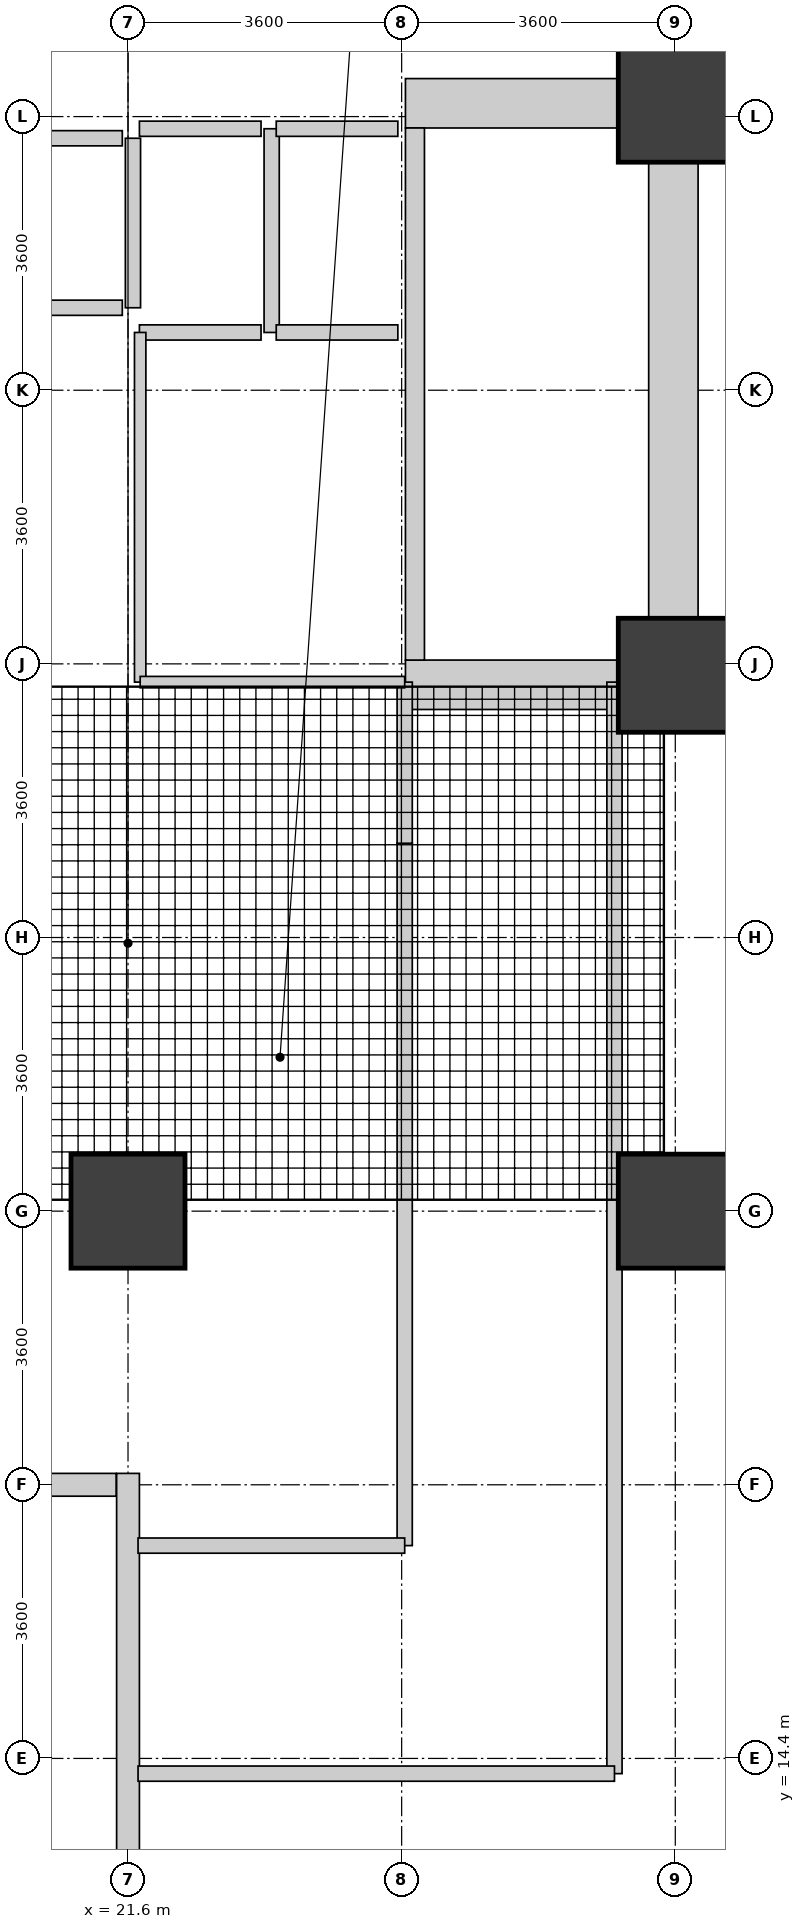
"""IFC4 building model, lengths in metres.
Left out: names, types, materials, properties, quantities, classifications, styles, units other than length and angle.
Written with IfcOpenShell. Run it as: python <this file> out.ifc"""

import sys

from ifc_helpers import new_model, si_unit, direction, frame, frame_2d, origin, origin_2d, place, context, subcontext, project, spatial, rectangle, extrude, source, transform, mapped, element, fill, save


model = new_model("IFC4")
c1 = context("Model", 3, precision=1e-05, world=origin(), true_north=direction((0.0, 1.0)))
c2 = subcontext(c1, "Body", "Model", "MODEL_VIEW")
j1 = project(units=[si_unit("LENGTHUNIT", "METRE"), si_unit("PLANEANGLEUNIT", "RADIAN")], contexts=[c1])
p1 = place(None, origin())
s1 = spatial("IfcSite", under=j1, at=p1, CompositionType="ELEMENT")
p2 = place(p1, origin())
s2 = spatial("IfcBuilding", under=s1, at=p2, CompositionType="ELEMENT")
p3 = place(p2, origin())
s3 = spatial("IfcBuildingStorey", under=s2, at=p3, CompositionType="ELEMENT", Elevation=0.0)
p4 = place(p3, frame((28.775, 28.2, 0.0), z_axis=(0.0, 0.0, 1.0), x_axis=(0.0, 1.0, 0.0)))
e1 = element("IfcWall", 1, at=p4, inside=s3, PredefinedType="SHEAR", context=c2, shape_type="SweptSolid", body=[
    extrude(rectangle(XDim=8.3, YDim=0.65, at=frame_2d((4.15, 0.0))), origin(), (0.0, 0.0, 1.0), 5.12),
])
p5 = place(p3, frame((25.25, 28.525, 0.0), z_axis=(0.0, 0.0, 1.0), x_axis=(1.0, 0.0, 0.0)))
e2 = element("IfcWall", 2, at=p5, inside=s3, PredefinedType="SHEAR", context=c2, shape_type="SweptSolid", body=[
    extrude(rectangle(XDim=3.2, YDim=0.65, at=frame_2d((1.6, 0.0))), origin(), (0.0, 0.0, 1.0), 5.12),
])
p6 = place(p5, frame((0.35, 0.0, 0.0)))
e3 = element("IfcOpeningElement", 3, at=p6, cuts=e2, PredefinedType="OPENING", context=c2, shape_type="SweptSolid", body=[
    extrude(rectangle(XDim=1.1, YDim=2.08, at=frame_2d((0.55, 1.04))), frame((0.0, 0.335, 0.0), z_axis=(0.0, -1.0, 0.0), x_axis=(1.0, 0.0, 0.0)), (0.0, 0.0, 1.0), 0.67),
])
p7 = place(p3, frame((25.25, 36.175, 0.0), z_axis=(0.0, 0.0, 1.0), x_axis=(1.0, 0.0, 0.0)))
e4 = element("IfcWall", 4, at=p7, inside=s3, PredefinedType="SHEAR", context=c2, shape_type="SweptSolid", body=[
    extrude(rectangle(XDim=3.2, YDim=0.65, at=frame_2d((1.6, 0.0))), origin(), (0.0, 0.0, 1.0), 5.12),
])
p8 = place(p3, frame((25.375, 28.85, 0.0), z_axis=(0.0, 0.0, 1.0), x_axis=(0.0, 1.0, 0.0)))
e5 = element("IfcWall", 5, at=p8, inside=s3, PredefinedType="SHEAR", context=c2, shape_type="SweptSolid", body=[
    extrude(rectangle(XDim=7.0, YDim=0.25, at=frame_2d((3.5, 0.0))), origin(), (0.0, 0.0, 1.0), 5.12),
])
p9 = place(p8, frame((0.15, 0.0, 0.0)))
e6 = element("IfcOpeningElement", 6, at=p9, cuts=e5, PredefinedType="OPENING", context=c2, shape_type="SweptSolid", body=[
    extrude(rectangle(XDim=1.1, YDim=2.08, at=frame_2d((0.55, 1.04))), frame((0.0, 0.135, 0.0), z_axis=(0.0, -1.0, 0.0), x_axis=(1.0, 0.0, 0.0)), (0.0, 0.0, 1.0), 0.27),
])
m1 = source(origin(), c2, "Body", "SweptSolid", [
    extrude(rectangle(XDim=1.5, YDim=1.5, at=origin_2d()), origin(), (0.0, 0.0, 1.0), 5.4),
])
for number, where, z_axis, x_axis in (
    (7, (21.6, 21.6, 0.0), (0.0, 0.0, 1.0), (1.0, 0.0, 0.0)),
    (8, (28.8, 21.6, 0.0), (0.0, 0.0, 1.0), (1.0, 0.0, 0.0)),
    (9, (28.8, 28.65, 0.0), (0.0, 0.0, 1.0), (1.0, 0.0, 0.0)),
    (10, (28.8, 36.15, 0.0), (0.0, 0.0, 1.0), (1.0, 0.0, 0.0)),
):
    element("IfcColumn", number, at=place(p3, frame(where, z_axis=z_axis, x_axis=x_axis)), inside=s3, PredefinedType="COLUMN", context=c2, shape_type="MappedRepresentation", body=[
        mapped(m1, transform((0.0, 0.0, 0.0), x_axis=(1.0, 0.0, 0.0), y_axis=(0.0, 1.0, 0.0), z_axis=(0.0, 0.0, 1.0), scale=1.0)),
    ])
p10 = place(p3, frame((21.445, 18.0, 0.0), z_axis=(0.0, 0.0, 1.0), x_axis=(-1.0, 0.0, 0.0)))
e11 = element("IfcWall", 11, at=p10, inside=s3, PredefinedType="STANDARD", context=c2, shape_type="SweptSolid", body=[
    extrude(rectangle(XDim=20.294, YDim=0.3, at=frame_2d((10.147, 0.0))), origin(), (0.0, 0.0, 1.0), 5.1),
])
p11 = place(p10, frame((4.02, 0.0, 0.0)))
e12 = element("IfcOpeningElement", 12, at=p11, cuts=e11, PredefinedType="OPENING", context=c2, shape_type="SweptSolid", body=[
    extrude(rectangle(XDim=1.85, YDim=2.25, at=frame_2d((0.925, 1.125))), frame((0.0, 0.16, 0.0), z_axis=(0.0, -1.0, 0.0), x_axis=(1.0, 0.0, 0.0)), (0.0, 0.0, 1.0), 0.32),
])
p12 = place(p10, frame((1.12, 0.0, 0.0)))
e13 = element("IfcOpeningElement", 13, at=p12, cuts=e11, PredefinedType="OPENING", context=c2, shape_type="SweptSolid", body=[
    extrude(rectangle(XDim=1.95, YDim=2.4, at=frame_2d((0.975, 1.2))), frame((0.0, 0.16, 0.0), z_axis=(0.0, -1.0, 0.0), x_axis=(1.0, 0.0, 0.0)), (0.0, 0.0, 1.0), 0.32),
])
p13 = place(p10, frame((7.256, 0.0, 0.9)))
e14 = element("IfcOpeningElement", 14, at=p13, cuts=e11, PredefinedType="OPENING", context=c2, shape_type="SweptSolid", body=[
    extrude(rectangle(XDim=2.4, YDim=2.5, at=frame_2d((1.2, 1.25))), frame((0.0, 0.16, 0.0), z_axis=(0.0, -1.0, 0.0), x_axis=(1.0, 0.0, 0.0)), (0.0, 0.0, 1.0), 0.32),
])
p14 = place(p10, frame((14.021, 0.0, 0.9)))
e15 = element("IfcOpeningElement", 15, at=p14, cuts=e11, PredefinedType="OPENING", context=c2, shape_type="SweptSolid", body=[
    extrude(rectangle(XDim=2.4, YDim=2.5, at=frame_2d((1.2, 1.25))), frame((0.0, 0.16, 0.0), z_axis=(0.0, -1.0, 0.0), x_axis=(1.0, 0.0, 0.0)), (0.0, 0.0, 1.0), 0.32),
])
p15 = place(p10, frame((17.403, 0.0, 0.9)))
e16 = element("IfcOpeningElement", 16, at=p15, cuts=e11, PredefinedType="OPENING", context=c2, shape_type="SweptSolid", body=[
    extrude(rectangle(XDim=2.4, YDim=2.5, at=frame_2d((1.2, 1.25))), frame((0.0, 0.16, 0.0), z_axis=(0.0, -1.0, 0.0), x_axis=(1.0, 0.0, 0.0)), (0.0, 0.0, 1.0), 0.32),
])
p16 = place(p3, frame((21.6, 1.65, 0.0), z_axis=(0.0, 0.0, 1.0), x_axis=(0.0, 1.0, 0.0)))
e17 = element("IfcWall", 17, at=p16, inside=s3, PredefinedType="STANDARD", context=c2, shape_type="SweptSolid", body=[
    extrude(rectangle(XDim=16.5, YDim=0.3, at=frame_2d((8.25, 0.0))), origin(), (0.0, 0.0, 1.0), 5.1),
])
p17 = place(p16, frame((13.125, 0.0, 0.0)))
e18 = element("IfcOpeningElement", 18, at=p17, cuts=e17, PredefinedType="OPENING", context=c2, shape_type="SweptSolid", body=[
    extrude(rectangle(XDim=1.85, YDim=2.25, at=frame_2d((0.925, 1.125))), frame((0.0, 0.16, 0.0), z_axis=(0.0, -1.0, 0.0), x_axis=(1.0, 0.0, 0.0)), (0.0, 0.0, 1.0), 0.32),
])
p18 = place(p16, frame((0.45, 0.0, 0.9)))
e19 = element("IfcOpeningElement", 19, at=p18, cuts=e17, PredefinedType="OPENING", context=c2, shape_type="SweptSolid", body=[
    extrude(rectangle(XDim=2.4, YDim=2.5, at=frame_2d((1.2, 1.25))), frame((0.0, 0.16, 0.0), z_axis=(0.0, -1.0, 0.0), x_axis=(1.0, 0.0, 0.0)), (0.0, 0.0, 1.0), 0.32),
])
p19 = place(p16, frame((7.05, 0.0, 0.9)))
e20 = element("IfcOpeningElement", 20, at=p19, cuts=e17, PredefinedType="OPENING", context=c2, shape_type="SweptSolid", body=[
    extrude(rectangle(XDim=2.4, YDim=2.5, at=frame_2d((1.2, 1.25))), frame((0.0, 0.16, 0.0), z_axis=(0.0, -1.0, 0.0), x_axis=(1.0, 0.0, 0.0)), (0.0, 0.0, 1.0), 0.32),
])
p20 = place(p3, frame((19.875, 33.485, 0.0), z_axis=(0.0, 0.0, 1.0), x_axis=(1.0, 0.0, 0.0)))
e21 = element("IfcWall", 21, at=p20, inside=s3, PredefinedType="PARTITIONING", context=c2, shape_type="SweptSolid", body=[
    extrude(rectangle(XDim=1.65, YDim=0.2, at=frame_2d((0.825, 0.0))), origin(), (0.0, 0.0, 1.0), 5.1),
])
p21 = place(p20, frame((0.275, 0.0, 0.0)))
e22 = element("IfcOpeningElement", 22, at=p21, cuts=e21, PredefinedType="OPENING", context=c2, shape_type="SweptSolid", body=[
    extrude(rectangle(XDim=1.1, YDim=2.12, at=frame_2d((0.55, 1.06))), frame((0.0, 0.11, 0.0), z_axis=(0.0, -1.0, 0.0), x_axis=(1.0, 0.0, 0.0)), (0.0, 0.0, 1.0), 0.22),
])
p22 = place(p3, frame((19.875, 35.715, 0.0), z_axis=(0.0, 0.0, 1.0), x_axis=(1.0, 0.0, 0.0)))
e23 = element("IfcWall", 23, at=p22, inside=s3, PredefinedType="PARTITIONING", context=c2, shape_type="SweptSolid", body=[
    extrude(rectangle(XDim=1.65, YDim=0.2, at=frame_2d((0.825, 0.0))), origin(), (0.0, 0.0, 1.0), 5.1),
])
p23 = place(p3, frame((21.665, 33.485, 0.0), z_axis=(0.0, 0.0, 1.0), x_axis=(0.0, 1.0, 0.0)))
e24 = element("IfcWall", 24, at=p23, inside=s3, PredefinedType="PARTITIONING", context=c2, shape_type="SweptSolid", body=[
    extrude(rectangle(XDim=2.23, YDim=0.2, at=frame_2d((1.115, 0.0))), origin(), (0.0, 0.0, 1.0), 5.1),
])
p24 = place(p3, frame((21.75, 33.16, 0.0), z_axis=(0.0, 0.0, 1.0), x_axis=(1.0, 0.0, 0.0)))
e25 = element("IfcWall", 25, at=p24, inside=s3, PredefinedType="PARTITIONING", context=c2, shape_type="SweptSolid", body=[
    extrude(rectangle(XDim=1.6, YDim=0.2, at=frame_2d((0.8, 0.0))), origin(), (0.0, 0.0, 1.0), 5.1),
])
p25 = place(p24, frame((0.2, 0.0, 0.0)))
e26 = element("IfcOpeningElement", 26, at=p25, cuts=e25, PredefinedType="OPENING", context=c2, shape_type="SweptSolid", body=[
    extrude(rectangle(XDim=1.2, YDim=2.12, at=frame_2d((0.6, 1.06))), frame((0.0, 0.11, 0.0), z_axis=(0.0, -1.0, 0.0), x_axis=(1.0, 0.0, 0.0)), (0.0, 0.0, 1.0), 0.22),
])
p26 = place(p3, frame((21.75, 35.84, 0.0), z_axis=(0.0, 0.0, 1.0), x_axis=(1.0, 0.0, 0.0)))
e27 = element("IfcWall", 27, at=p26, inside=s3, PredefinedType="PARTITIONING", context=c2, shape_type="SweptSolid", body=[
    extrude(rectangle(XDim=1.6, YDim=0.2, at=frame_2d((0.8, 0.0))), origin(), (0.0, 0.0, 1.0), 3.9),
])
p27 = place(p3, frame((23.49, 33.16, 0.0), z_axis=(0.0, 0.0, 1.0), x_axis=(0.0, 1.0, 0.0)))
e28 = element("IfcWall", 28, at=p27, inside=s3, PredefinedType="PARTITIONING", context=c2, shape_type="SweptSolid", body=[
    extrude(rectangle(XDim=2.68, YDim=0.2, at=frame_2d((1.34, 0.0))), origin(), (0.0, 0.0, 1.0), 5.1),
])
p28 = place(p3, frame((23.55, 33.16, 0.0), z_axis=(0.0, 0.0, 1.0), x_axis=(1.0, 0.0, 0.0)))
e29 = element("IfcWall", 29, at=p28, inside=s3, PredefinedType="PARTITIONING", context=c2, shape_type="SweptSolid", body=[
    extrude(rectangle(XDim=1.6, YDim=0.2, at=frame_2d((0.8, 0.0))), origin(), (0.0, 0.0, 1.0), 5.1),
])
p29 = place(p28, frame((0.2, 0.0, 0.0)))
e30 = element("IfcOpeningElement", 30, at=p29, cuts=e29, PredefinedType="OPENING", context=c2, shape_type="SweptSolid", body=[
    extrude(rectangle(XDim=1.2, YDim=2.12, at=frame_2d((0.6, 1.06))), frame((0.0, 0.11, 0.0), z_axis=(0.0, -1.0, 0.0), x_axis=(1.0, 0.0, 0.0)), (0.0, 0.0, 1.0), 0.22),
])
p30 = place(p3, frame((23.55, 35.84, 0.0), z_axis=(0.0, 0.0, 1.0), x_axis=(1.0, 0.0, 0.0)))
e31 = element("IfcWall", 31, at=p30, inside=s3, PredefinedType="PARTITIONING", context=c2, shape_type="SweptSolid", body=[
    extrude(rectangle(XDim=1.6, YDim=0.2, at=frame_2d((0.8, 0.0))), origin(), (0.0, 0.0, 1.0), 3.9),
])
p31 = place(p3, frame((28.0, 14.2, 0.0), z_axis=(0.0, 0.0, 1.0), x_axis=(0.0, 1.0, 0.0)))
e32 = element("IfcWall", 32, at=p31, inside=s3, PredefinedType="PARTITIONING", context=c2, shape_type="SweptSolid", body=[
    extrude(rectangle(XDim=14.36, YDim=0.2, at=frame_2d((7.18, 0.0))), origin(), (0.0, 0.0, 1.0), 5.1),
])
p32 = place(p3, frame((25.24, 17.2, 0.0), z_axis=(0.0, 0.0, 1.0), x_axis=(0.0, 1.0, 0.0)))
e33 = element("IfcWall", 33, at=p32, inside=s3, PredefinedType="PARTITIONING", context=c2, shape_type="SweptSolid", body=[
    extrude(rectangle(XDim=9.24, YDim=0.2, at=frame_2d((4.62, 0.0))), origin(), (0.0, 0.0, 1.0), 5.1),
])
p33 = place(p3, frame((21.732, 14.2, 0.0), z_axis=(0.0, 0.0, 1.0), x_axis=(1.0, 0.0, 0.0)))
e34 = element("IfcWall", 34, at=p33, inside=s3, PredefinedType="PARTITIONING", context=c2, shape_type="SweptSolid", body=[
    extrude(rectangle(XDim=6.268, YDim=0.2, at=frame_2d((3.134, 0.0))), origin(), (0.0, 0.0, 1.0), 5.1),
])
p34 = place(p3, frame((21.732, 17.2, 0.0), z_axis=(0.0, 0.0, 1.0), x_axis=(1.0, 0.0, 0.0)))
e35 = element("IfcWall", 35, at=p34, inside=s3, PredefinedType="PARTITIONING", context=c2, shape_type="SweptSolid", body=[
    extrude(rectangle(XDim=3.508, YDim=0.2, at=frame_2d((1.754, 0.0))), origin(), (0.0, 0.0, 1.0), 5.1),
])
p35 = place(p3, frame((25.24, 26.44, 0.0), z_axis=(0.0, 0.0, 1.0), x_axis=(0.0, 1.0, 0.0)))
e36 = element("IfcWall", 36, at=p35, inside=s3, PredefinedType="PARTITIONING", context=c2, shape_type="SweptSolid", body=[
    extrude(rectangle(XDim=2.12, YDim=0.2, at=frame_2d((1.06, 0.0))), origin(), (0.0, 0.0, 1.0), 5.1),
])
p36 = place(p3, frame((21.76, 28.56, 0.0), z_axis=(0.0, 0.0, 1.0), x_axis=(0.0, 1.0, 0.0)))
e37 = element("IfcWall", 37, at=p36, inside=s3, PredefinedType="PARTITIONING", context=c2, shape_type="SweptSolid", body=[
    extrude(rectangle(XDim=4.6, YDim=0.15, at=frame_2d((2.3, 0.0))), origin(), (0.0, 0.0, 1.0), 5.1),
])
p37 = place(p36, frame((1.55, 0.0, 0.0)))
e38 = element("IfcOpeningElement", 38, at=p37, cuts=e37, PredefinedType="OPENING", context=c2, shape_type="SweptSolid", body=[
    extrude(rectangle(XDim=1.5, YDim=2.1, at=frame_2d((0.75, 1.05))), frame((0.0, 0.085, 0.0), z_axis=(0.0, -1.0, 0.0), x_axis=(1.0, 0.0, 0.0)), (0.0, 0.0, 1.0), 0.17),
])
p38 = place(p3, frame((21.76, 28.56, 0.0), z_axis=(0.0, 0.0, 1.0), x_axis=(1.0, 0.0, 0.0)))
e39 = element("IfcWall", 39, at=p38, inside=s3, PredefinedType="PARTITIONING", context=c2, shape_type="SweptSolid", body=[
    extrude(rectangle(XDim=3.48, YDim=0.15, at=frame_2d((1.74, 0.0))), origin(), (0.0, 0.0, 1.0), 3.9),
])
p39 = place(p17, origin())
e40 = element("IfcDoor", 40, at=p39, inside=s3, OperationType="DOUBLE_DOOR_SINGLE_SWING", PredefinedType="DOOR", context=c2, shape_type="SweptSolid", body=[
    extrude(rectangle(XDim=1.85, YDim=2.25, at=frame_2d((0.925, 1.125))), frame((0.0, 0.025, 0.0), z_axis=(0.0, -1.0, 0.0), x_axis=(1.0, 0.0, 0.0)), (0.0, 0.0, 1.0), 0.05),
])
fill(e18, e40)
p40 = place(p9, origin())
e41 = element("IfcDoor", 41, at=p40, inside=s3, OperationType="SINGLE_SWING_LEFT", PredefinedType="DOOR", context=c2, shape_type="SweptSolid", body=[
    extrude(rectangle(XDim=1.1, YDim=2.08, at=frame_2d((0.55, 1.04))), frame((0.0, 0.025, 0.0), z_axis=(0.0, -1.0, 0.0), x_axis=(1.0, 0.0, 0.0)), (0.0, 0.0, 1.0), 0.05),
])
fill(e6, e41)
p41 = place(p6, origin())
e42 = element("IfcDoor", 42, at=p41, inside=s3, OperationType="SINGLE_SWING_RIGHT", PredefinedType="DOOR", context=c2, shape_type="SweptSolid", body=[
    extrude(rectangle(XDim=1.1, YDim=2.08, at=frame_2d((0.55, 1.04))), frame((0.0, 0.025, 0.0), z_axis=(0.0, -1.0, 0.0), x_axis=(1.0, 0.0, 0.0)), (0.0, 0.0, 1.0), 0.05),
])
fill(e3, e42)
p42 = place(p21, origin())
e43 = element("IfcDoor", 43, at=p42, inside=s3, OperationType="SLIDING_TO_LEFT", PredefinedType="DOOR", context=c2, shape_type="SweptSolid", body=[
    extrude(rectangle(XDim=1.1, YDim=2.12, at=frame_2d((0.55, 1.06))), frame((0.0, 0.025, 0.0), z_axis=(0.0, -1.0, 0.0), x_axis=(1.0, 0.0, 0.0)), (0.0, 0.0, 1.0), 0.05),
])
fill(e22, e43)
p43 = place(p25, origin())
e44 = element("IfcDoor", 44, at=p43, inside=s3, OperationType="SLIDING_TO_RIGHT", PredefinedType="DOOR", context=c2, shape_type="SweptSolid", body=[
    extrude(rectangle(XDim=1.2, YDim=2.12, at=frame_2d((0.6, 1.06))), frame((0.0, 0.025, 0.0), z_axis=(0.0, -1.0, 0.0), x_axis=(1.0, 0.0, 0.0)), (0.0, 0.0, 1.0), 0.05),
])
fill(e26, e44)
p44 = place(p29, origin())
e45 = element("IfcDoor", 45, at=p44, inside=s3, OperationType="SLIDING_TO_RIGHT", PredefinedType="DOOR", context=c2, shape_type="SweptSolid", body=[
    extrude(rectangle(XDim=1.2, YDim=2.12, at=frame_2d((0.6, 1.06))), frame((0.0, 0.025, 0.0), z_axis=(0.0, -1.0, 0.0), x_axis=(1.0, 0.0, 0.0)), (0.0, 0.0, 1.0), 0.05),
])
fill(e30, e45)
p45 = place(p37, origin())
e46 = element("IfcDoor", 46, at=p45, inside=s3, OperationType="DOUBLE_DOOR_SINGLE_SWING", PredefinedType="DOOR", context=c2, shape_type="SweptSolid", body=[
    extrude(rectangle(XDim=1.5, YDim=2.1, at=frame_2d((0.75, 1.05))), frame((0.0, 0.025, 0.0), z_axis=(0.0, -1.0, 0.0), x_axis=(1.0, 0.0, 0.0)), (0.0, 0.0, 1.0), 0.05),
])
fill(e38, e46)
save(model, sys.argv[1])
